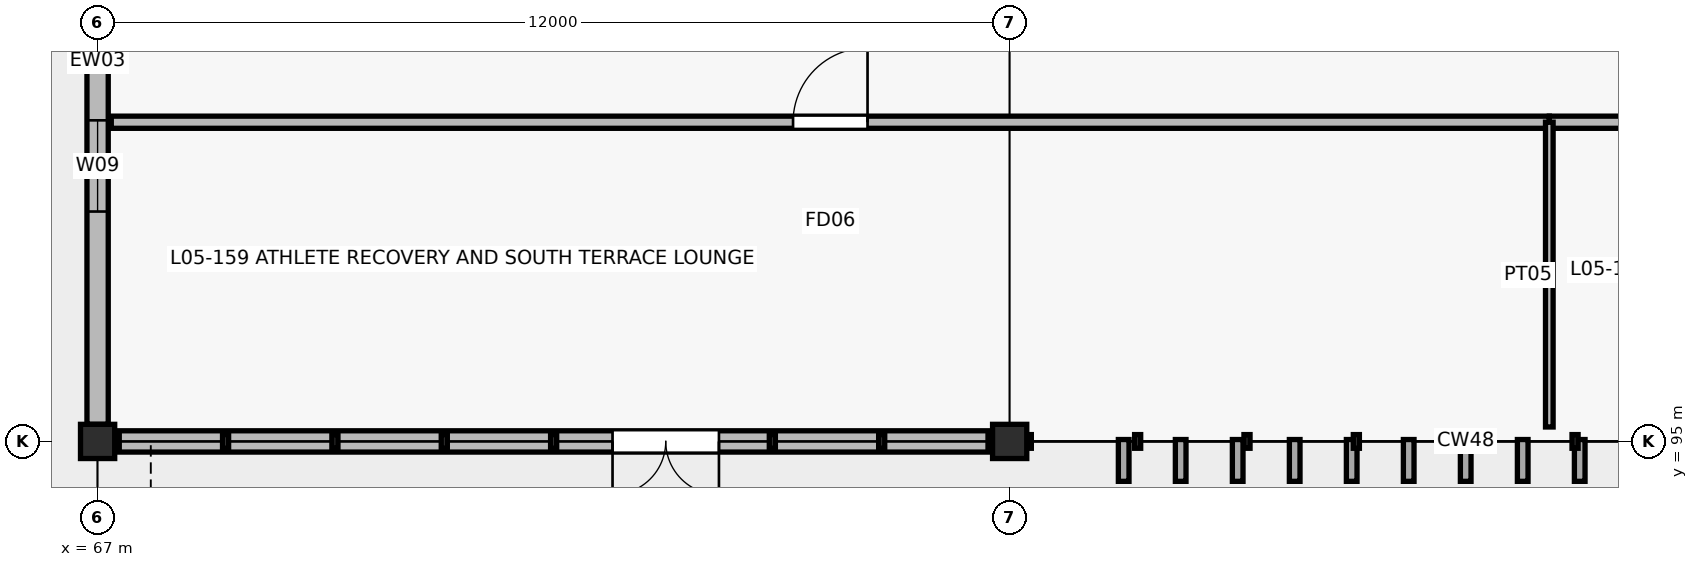
"""IFC4 building model, lengths in metres.
Left out: names, types, materials, properties, quantities, classifications, styles, units other than length and angle.
Written with IfcOpenShell. Run it as: python <this file> out.ifc"""

import sys

from ifc_helpers import new_model, si_unit, direction, frame, frame_2d, origin, origin_2d, place, context, subcontext, project, spatial, rectangle, extrude, element, fill, save


model = new_model("IFC4")
c1 = context("Model", 3, precision=1e-05, world=origin(), true_north=direction((0.0, 1.0)))
c2 = subcontext(c1, "Body", "Model", "MODEL_VIEW")
j1 = project(units=[si_unit("LENGTHUNIT", "METRE"), si_unit("PLANEANGLEUNIT", "RADIAN")], contexts=[c1])
p1 = place(None, origin())
s1 = spatial("IfcSite", under=j1, at=p1, CompositionType="ELEMENT")
p2 = place(p1, origin())
s2 = spatial("IfcBuilding", under=s1, at=p2, CompositionType="ELEMENT")
p3 = place(p2, frame((0.0, 0.0, 21.6)))
s3 = spatial("IfcBuildingStorey", under=s2, at=p3, CompositionType="ELEMENT", Elevation=21.6)
for number, where, z_axis, x_axis in (
    (1, (67.0, 95.0, 0.0), (0.0, 0.0, 1.0), (1.0, 0.0, 0.0)),
    (2, (79.0, 95.0, 0.0), (0.0, 0.0, 1.0), (1.0, 0.0, 0.0)),
):
    element("IfcColumn", number, at=place(p3, frame(where, z_axis=z_axis, x_axis=x_axis)), inside=s3, PredefinedType="COLUMN", context=c2, shape_type="SweptSolid", body=[
        extrude(rectangle(XDim=0.45, YDim=0.45, at=origin_2d()), origin(), (0.0, 0.0, 1.0), 4.2),
    ])
p4 = place(p3, frame((78.775, 95.0, 0.0), z_axis=(0.0, 0.0, 1.0), x_axis=(-1.0, 0.0, 0.0)))
e3 = element("IfcWall", 3, at=p4, inside=s3, PredefinedType="SOLIDWALL", context=c2, shape_type="SweptSolid", body=[
    extrude(rectangle(XDim=11.55, YDim=0.28, at=frame_2d((5.775, 0.0))), origin(), (0.0, 0.0, 1.0), 3.25),
])
p5 = place(p4, frame((3.6, 0.0, 0.0)))
e4 = element("IfcOpeningElement", 4, at=p5, cuts=e3, PredefinedType="OPENING", context=c2, shape_type="SweptSolid", body=[
    extrude(rectangle(XDim=1.4, YDim=2.2, at=frame_2d((0.7, 1.1))), frame((0.0, 0.15, 0.0), z_axis=(0.0, -1.0, 0.0), x_axis=(1.0, 0.0, 0.0)), (0.0, 0.0, 1.0), 0.3),
])
p6 = place(p3, frame((67.0, 95.225, 0.0), z_axis=(0.0, 0.0, 1.0), x_axis=(0.0, 1.0, 0.0)))
e5 = element("IfcWall", 5, at=p6, inside=s3, PredefinedType="SOLIDWALL", context=c2, shape_type="SweptSolid", body=[
    extrude(rectangle(XDim=9.55, YDim=0.28, at=frame_2d((4.775, 0.0))), origin(), (0.0, 0.0, 1.0), 3.25),
])
p7 = place(p6, frame((2.8, 0.0, 0.9)))
e6 = element("IfcOpeningElement", 6, at=p7, cuts=e5, PredefinedType="OPENING", context=c2, shape_type="SweptSolid", body=[
    extrude(rectangle(XDim=1.2, YDim=1.8, at=frame_2d((0.6, 0.9))), frame((0.0, 0.15, 0.0), z_axis=(0.0, -1.0, 0.0), x_axis=(1.0, 0.0, 0.0)), (0.0, 0.0, 1.0), 0.3),
])
p8 = place(p3, frame((67.18, 99.2, 0.0), z_axis=(0.0, 0.0, 1.0), x_axis=(1.0, 0.0, 0.0)))
e7 = element("IfcWall", 7, at=p8, inside=s3, PredefinedType="PARTITIONING", context=c2, shape_type="SweptSolid", body=[
    extrude(rectangle(XDim=18.92, YDim=0.16, at=frame_2d((9.46, 0.0))), origin(), (0.0, 0.0, 1.0), 3.25),
])
p9 = place(p8, frame((8.97, 0.0, 0.0)))
e8 = element("IfcOpeningElement", 8, at=p9, cuts=e7, PredefinedType="OPENING", context=c2, shape_type="SweptSolid", body=[
    extrude(rectangle(XDim=0.98, YDim=2.1, at=frame_2d((0.49, 1.05))), frame((0.0, 0.09, 0.0), z_axis=(0.0, -1.0, 0.0), x_axis=(1.0, 0.0, 0.0)), (0.0, 0.0, 1.0), 0.18),
])
p10 = place(p3, frame((86.1, 99.2, 0.0), z_axis=(0.0, 0.0, 1.0), x_axis=(1.0, 0.0, 0.0)))
e9 = element("IfcWall", 9, at=p10, inside=s3, PredefinedType="PARTITIONING", context=c2, shape_type="SweptSolid", body=[
    extrude(rectangle(XDim=20.0, YDim=0.16, at=frame_2d((10.0, 0.0))), origin(), (0.0, 0.0, 1.0), 3.25),
])
p11 = place(p10, frame((9.475, 0.0, 0.0)))
e10 = element("IfcOpeningElement", 10, at=p11, cuts=e9, PredefinedType="OPENING", context=c2, shape_type="SweptSolid", body=[
    extrude(rectangle(XDim=1.05, YDim=2.1, at=frame_2d((0.525, 1.05))), frame((0.0, 0.09, 0.0), z_axis=(0.0, -1.0, 0.0), x_axis=(1.0, 0.0, 0.0)), (0.0, 0.0, 1.0), 0.18),
])
p12 = place(p3, frame((86.1, 95.19, 0.0), z_axis=(0.0, 0.0, 1.0), x_axis=(0.0, 1.0, 0.0)))
e11 = element("IfcWall", 11, at=p12, inside=s3, PredefinedType="PARTITIONING", context=c2, shape_type="SweptSolid", body=[
    extrude(rectangle(XDim=4.01, YDim=0.1, at=frame_2d((2.005, 0.0))), origin(), (0.0, 0.0, 1.0), 3.3),
])
p13 = place(p5, origin())
e12 = element("IfcDoor", 12, at=p13, inside=s3, OperationType="DOUBLE_DOOR_SINGLE_SWING", PredefinedType="DOOR", context=c2, shape_type="SweptSolid", body=[
    extrude(rectangle(XDim=1.4, YDim=2.2, at=frame_2d((0.7, 1.1))), frame((0.0, 0.025, 0.0), z_axis=(0.0, -1.0, 0.0), x_axis=(1.0, 0.0, 0.0)), (0.0, 0.0, 1.0), 0.05),
])
fill(e4, e12)
p14 = place(p7, origin())
e13 = element("IfcWindow", 13, at=p14, inside=s3, PartitioningType="SINGLE_PANEL", PredefinedType="WINDOW", context=c2, shape_type="SweptSolid", body=[
    extrude(rectangle(XDim=1.2, YDim=1.8, at=frame_2d((0.6, 0.9))), frame((0.0, 0.03, 0.0), z_axis=(0.0, -1.0, 0.0), x_axis=(1.0, 0.0, 0.0)), (0.0, 0.0, 1.0), 0.06),
])
fill(e6, e13)
p15 = place(p9, origin())
e14 = element("IfcDoor", 14, at=p15, inside=s3, OperationType="SINGLE_SWING_RIGHT", PredefinedType="DOOR", context=c2, shape_type="SweptSolid", body=[
    extrude(rectangle(XDim=0.98, YDim=2.1, at=frame_2d((0.49, 1.05))), frame((0.0, 0.025, 0.0), z_axis=(0.0, -1.0, 0.0), x_axis=(1.0, 0.0, 0.0)), (0.0, 0.0, 1.0), 0.05),
])
fill(e8, e14)
save(model, sys.argv[1])
